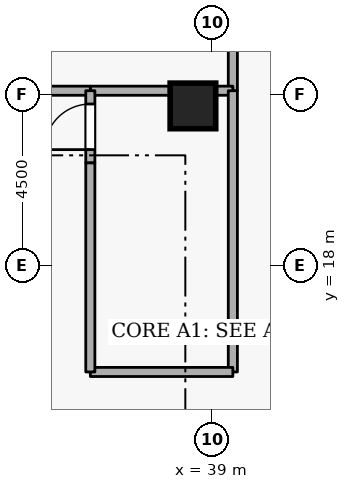
"""IFC4 building model, lengths in metres.
Left out: names, types, materials, properties, quantities, classifications, styles, units other than length and angle.
Written with IfcOpenShell. Run it as: python <this file> out.ifc"""

import sys

from ifc_helpers import new_model, si_unit, direction, frame, frame_2d, origin, origin_2d, place, context, subcontext, project, spatial, rectangle, extrude, element, fill, save


model = new_model("IFC4")
c1 = context("Model", 3, precision=1e-05, world=origin(), true_north=direction((0.0, 1.0)))
c2 = subcontext(c1, "Body", "Model", "MODEL_VIEW")
j1 = project(units=[si_unit("LENGTHUNIT", "METRE"), si_unit("PLANEANGLEUNIT", "RADIAN")], contexts=[c1])
p1 = place(None, origin())
s1 = spatial("IfcSite", under=j1, at=p1, CompositionType="ELEMENT")
p2 = place(p1, origin())
s2 = spatial("IfcBuilding", under=s1, at=p2, CompositionType="ELEMENT")
p3 = place(p2, frame((0.0, 0.0, 141.3)))
s3 = spatial("IfcBuildingStorey", under=s2, at=p3, CompositionType="ELEMENT", Elevation=141.3)
p4 = place(p3, frame((38.5, 22.2, 0.0), z_axis=(0.0, 0.0, 1.0), x_axis=(1.0, 0.0, 0.0)))
e1 = element("IfcColumn", 1, at=p4, inside=s3, PredefinedType="COLUMN", context=c2, shape_type="SweptSolid", body=[
    extrude(rectangle(XDim=1.2, YDim=1.2, at=origin_2d()), origin(), (0.0, 0.0, 1.0), 4.2),
])
p5 = place(p3, frame((39.55, 27.72, 0.0), z_axis=(0.0, 0.0, 1.0), x_axis=(0.0, -1.0, 0.0)))
e2 = element("IfcWall", 2, at=p5, inside=s3, PredefinedType="STANDARD", context=c2, shape_type="SweptSolid", body=[
    extrude(rectangle(XDim=5.12, YDim=0.24, at=frame_2d((2.56, 0.0))), origin(), (0.0, 0.0, 1.0), 3.94),
])
p6 = place(p3, frame((39.55, 22.6, 0.0), z_axis=(0.0, 0.0, 1.0), x_axis=(-1.0, 0.0, 0.0)))
e3 = element("IfcWall", 3, at=p6, inside=s3, PredefinedType="STANDARD", context=c2, shape_type="SweptSolid", body=[
    extrude(rectangle(XDim=3.75, YDim=0.24, at=frame_2d((1.875, 0.0))), origin(), (0.0, 0.0, 1.0), 3.94),
])
p7 = place(p3, frame((35.8, 22.6, 0.0), z_axis=(0.0, 0.0, 1.0), x_axis=(-1.0, 0.0, 0.0)))
e4 = element("IfcWall", 4, at=p7, inside=s3, PredefinedType="STANDARD", context=c2, shape_type="SweptSolid", body=[
    extrude(rectangle(XDim=2.9, YDim=0.24, at=frame_2d((1.45, 0.0))), origin(), (0.0, 0.0, 1.0), 3.94),
])
p8 = place(p3, frame((35.8, 20.7, 0.0), z_axis=(0.0, 0.0, 1.0), x_axis=(0.0, 1.0, 0.0)))
e5 = element("IfcWall", 5, at=p8, inside=s3, PredefinedType="STANDARD", context=c2, shape_type="SweptSolid", body=[
    extrude(rectangle(XDim=1.9, YDim=0.24, at=frame_2d((0.95, 0.0))), origin(), (0.0, 0.0, 1.0), 3.94),
])
p9 = place(p8, frame((0.35, 0.0, 0.0)))
e6 = element("IfcOpeningElement", 6, at=p9, cuts=e5, PredefinedType="OPENING", context=c2, shape_type="SweptSolid", body=[
    extrude(rectangle(XDim=1.2, YDim=2.1, at=frame_2d((0.6, 1.05))), frame((0.0, 0.13, 0.0), z_axis=(0.0, -1.0, 0.0), x_axis=(1.0, 0.0, 0.0)), (0.0, 0.0, 1.0), 0.26),
])
p10 = place(p3, frame((39.55, 22.6, 0.0), z_axis=(0.0, 0.0, 1.0), x_axis=(0.0, -1.0, 0.0)))
e7 = element("IfcWall", 7, at=p10, inside=s3, PredefinedType="STANDARD", context=c2, shape_type="SweptSolid", body=[
    extrude(rectangle(XDim=7.4, YDim=0.24, at=frame_2d((3.7, 0.0))), origin(), (0.0, 0.0, 1.0), 3.94),
])
p11 = place(p3, frame((39.55, 15.2, 0.0), z_axis=(0.0, 0.0, 1.0), x_axis=(-1.0, 0.0, 0.0)))
e8 = element("IfcWall", 8, at=p11, inside=s3, PredefinedType="STANDARD", context=c2, shape_type="SweptSolid", body=[
    extrude(rectangle(XDim=3.75, YDim=0.24, at=frame_2d((1.875, 0.0))), origin(), (0.0, 0.0, 1.0), 3.94),
])
p12 = place(p3, frame((35.8, 15.2, 0.0), z_axis=(0.0, 0.0, 1.0), x_axis=(0.0, 1.0, 0.0)))
e9 = element("IfcWall", 9, at=p12, inside=s3, PredefinedType="STANDARD", context=c2, shape_type="SweptSolid", body=[
    extrude(rectangle(XDim=5.5, YDim=0.24, at=frame_2d((2.75, 0.0))), origin(), (0.0, 0.0, 1.0), 3.94),
])
p13 = place(p9, origin())
e10 = element("IfcDoor", 10, at=p13, inside=s3, OperationType="SINGLE_SWING_LEFT", PredefinedType="DOOR", context=c2, shape_type="SweptSolid", body=[
    extrude(rectangle(XDim=1.2, YDim=2.1, at=frame_2d((0.6, 1.05))), frame((0.0, 0.025, 0.0), z_axis=(0.0, -1.0, 0.0), x_axis=(1.0, 0.0, 0.0)), (0.0, 0.0, 1.0), 0.05),
])
fill(e6, e10)
save(model, sys.argv[1])
